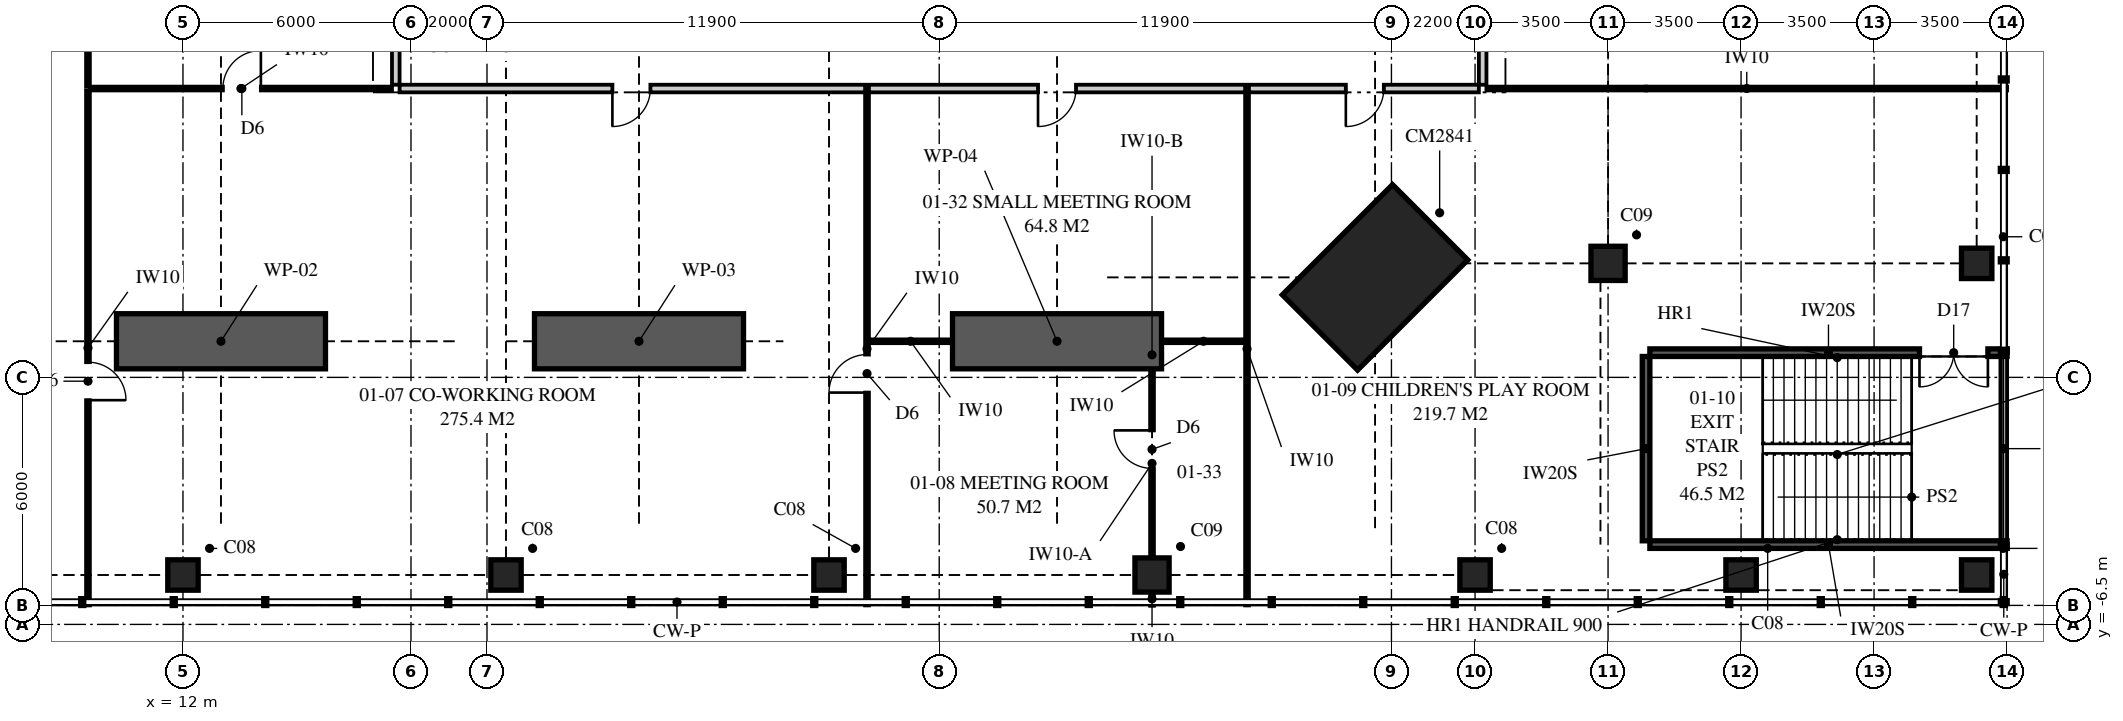
"""IFC4 building model, lengths in metres.
Left out: names, types, materials, properties, quantities, classifications, styles, units other than length and angle.
Written with IfcOpenShell. Run it as: python <this file> out.ifc"""

import sys

from ifc_helpers import new_model, si_unit, direction, frame, frame_2d, origin, origin_2d, place, context, subcontext, project, spatial, polyline, rectangle, outline, extrude, element, fill, save


model = new_model("IFC4")
c1 = context("Model", 3, precision=1e-05, world=origin(), true_north=direction((0.0, 1.0)))
c2 = subcontext(c1, "Body", "Model", "MODEL_VIEW")
j1 = project(units=[si_unit("LENGTHUNIT", "METRE"), si_unit("PLANEANGLEUNIT", "RADIAN")], contexts=[c1])
p1 = place(None, origin())
s1 = spatial("IfcSite", under=j1, at=p1, CompositionType="ELEMENT")
p2 = place(p1, origin())
s2 = spatial("IfcBuilding", under=s1, at=p2, CompositionType="ELEMENT")
p3 = place(p2, frame((0.0, 0.0, 6.0)))
s3 = spatial("IfcBuildingStorey", under=s2, at=p3, CompositionType="ELEMENT", Elevation=6.0)
p4 = place(p3, frame((43.369, 2.631, 0.0), z_axis=(0.0, 0.0, 1.0), x_axis=(-0.707106781187, 0.707106781187, 0.0)))
e1 = element("IfcColumn", 1, at=p4, inside=s3, PredefinedType="COLUMN", context=c2, shape_type="SweptSolid", body=[
    extrude(rectangle(XDim=2.8, YDim=4.1, at=origin_2d()), origin(), (0.0, 0.0, 1.0), 5.0),
])
for number, where, z_axis, x_axis in (
    (2, (12.0, -5.2, 0.0), (0.0, 0.0, 1.0), (1.0, 0.0, 0.0)),
    (3, (20.5, -5.2, 0.0), (0.0, 0.0, 1.0), (1.0, 0.0, 0.0)),
    (4, (29.0, -5.2, 0.0), (0.0, 0.0, 1.0), (1.0, 0.0, 0.0)),
):
    element("IfcColumn", number, at=place(p3, frame(where, z_axis=z_axis, x_axis=x_axis)), inside=s3, PredefinedType="COLUMN", context=c2, shape_type="SweptSolid", body=[
        extrude(rectangle(XDim=0.8, YDim=0.8, at=origin_2d()), origin(), (0.0, 0.0, 1.0), 5.0),
    ])
p5 = place(p3, frame((37.5, -5.2, 0.0), z_axis=(0.0, 0.0, 1.0), x_axis=(1.0, 0.0, 0.0)))
e5 = element("IfcColumn", 5, at=p5, inside=s3, PredefinedType="COLUMN", context=c2, shape_type="SweptSolid", body=[
    extrude(rectangle(XDim=0.9, YDim=0.9, at=origin_2d()), origin(), (0.0, 0.0, 1.0), 5.0),
])
for number, where, z_axis, x_axis in (
    (6, (46.0, -5.2, 0.0), (0.0, 0.0, 1.0), (1.0, 0.0, 0.0)),
    (7, (53.0, -5.2, 0.0), (0.0, 0.0, 1.0), (1.0, 0.0, 0.0)),
    (8, (59.2, -5.2, 0.0), (0.0, 0.0, 1.0), (1.0, 0.0, 0.0)),
):
    element("IfcColumn", number, at=place(p3, frame(where, z_axis=z_axis, x_axis=x_axis)), inside=s3, PredefinedType="COLUMN", context=c2, shape_type="SweptSolid", body=[
        extrude(rectangle(XDim=0.8, YDim=0.8, at=origin_2d()), origin(), (0.0, 0.0, 1.0), 5.0),
    ])
p6 = place(p3, frame((49.5, 3.0, 0.0), z_axis=(0.0, 0.0, 1.0), x_axis=(1.0, 0.0, 0.0)))
e9 = element("IfcColumn", 9, at=p6, inside=s3, PredefinedType="COLUMN", context=c2, shape_type="SweptSolid", body=[
    extrude(rectangle(XDim=0.9, YDim=0.9, at=origin_2d()), origin(), (0.0, 0.0, 1.0), 5.0),
])
p7 = place(p3, frame((59.2, 3.0, 0.0), z_axis=(0.0, 0.0, 1.0), x_axis=(1.0, 0.0, 0.0)))
e10 = element("IfcColumn", 10, at=p7, inside=s3, PredefinedType="COLUMN", context=c2, shape_type="SweptSolid", body=[
    extrude(rectangle(XDim=0.8, YDim=0.8, at=origin_2d()), origin(), (0.0, 0.0, 1.0), 5.0),
])
p8 = place(p3, frame((59.913, -4.45, 0.0), z_axis=(0.0, 0.0, 1.0), x_axis=(0.0, 1.0, 0.0)))
e11 = element("IfcWall", 11, at=p8, inside=s3, PredefinedType="SOLIDWALL", context=c2, shape_type="SweptSolid", body=[
    extrude(rectangle(XDim=5.15, YDim=0.175, at=frame_2d((2.575, 0.0))), origin(), (0.0, 0.0, 1.0), 4.72),
])
p9 = place(p3, frame((9.5, 7.65, 0.0), z_axis=(0.0, 0.0, 1.0), x_axis=(0.0, 1.0, 0.0)))
e12 = element("IfcWall", 12, at=p9, inside=s3, PredefinedType="PARTITIONING", context=c2, shape_type="SweptSolid", body=[
    extrude(outline(polyline([(0.0, 0.0), (5.35, 0.0), (5.35, 4.12), (4.09, 4.12), (4.09, 4.72), (0.0, 4.72), (0.0, 0.0)])), frame((0.0, 0.05, 0.0), z_axis=(0.0, -1.0, 0.0), x_axis=(1.0, 0.0, 0.0)), (0.0, 0.0, 1.0), 0.1),
])
p10 = place(p3, frame((9.5, -6.0, 0.0), z_axis=(0.0, 0.0, 1.0), x_axis=(0.0, 1.0, 0.0)))
e13 = element("IfcWall", 13, at=p10, inside=s3, PredefinedType="PARTITIONING", context=c2, shape_type="SweptSolid", body=[
    extrude(outline(polyline([(0.0, 0.0), (13.55, 0.0), (13.55, 4.72), (8.21, 4.72), (8.21, 3.92), (5.69, 3.92), (5.69, 4.72), (2.06, 4.72), (2.06, 4.12), (0.0, 4.12), (0.0, 4.72), (0.0, 0.0)])), frame((0.0, 0.05, 0.0), z_axis=(0.0, -1.0, 0.0), x_axis=(1.0, 0.0, 0.0)), (0.0, 0.0, 1.0), 0.1),
])
p11 = place(p10, frame((5.4, 0.0, 0.0)))
e14 = element("IfcOpeningElement", 14, at=p11, cuts=e13, PredefinedType="OPENING", context=c2, shape_type="SweptSolid", body=[
    extrude(rectangle(XDim=1.0, YDim=2.1, at=frame_2d((0.5, 1.05))), frame((0.0, 0.06, 0.0), z_axis=(0.0, -1.0, 0.0), x_axis=(1.0, 0.0, 0.0)), (0.0, 0.0, 1.0), 0.12),
])
p12 = place(p3, frame((9.55, 7.6, 0.0), z_axis=(0.0, 0.0, 1.0), x_axis=(1.0, 0.0, 0.0)))
e15 = element("IfcWall", 15, at=p12, inside=s3, PredefinedType="PARTITIONING", context=c2, shape_type="SweptSolid", body=[
    extrude(outline(polyline([(0.0, 0.0), (7.95, 0.0), (7.95, 4.72), (4.71, 4.72), (4.71, 4.12), (2.19, 4.12), (2.19, 4.72), (0.0, 4.72), (0.0, 0.0)])), frame((0.0, 0.05, 0.0), z_axis=(0.0, -1.0, 0.0), x_axis=(1.0, 0.0, 0.0)), (0.0, 0.0, 1.0), 0.1),
])
p13 = place(p12, frame((3.5, 0.0, 0.0)))
e16 = element("IfcOpeningElement", 16, at=p13, cuts=e15, PredefinedType="OPENING", context=c2, shape_type="SweptSolid", body=[
    extrude(rectangle(XDim=1.0, YDim=2.1, at=frame_2d((0.5, 1.05))), frame((0.0, 0.06, 0.0), z_axis=(0.0, -1.0, 0.0), x_axis=(1.0, 0.0, 0.0)), (0.0, 0.0, 1.0), 0.12),
])
p14 = place(p3, frame((17.6, 7.7, 0.0), z_axis=(0.0, 0.0, 1.0), x_axis=(0.0, 1.0, 0.0)))
e17 = element("IfcWall", 17, at=p14, inside=s3, PredefinedType="PARTITIONING", context=c2, shape_type="SweptSolid", body=[
    extrude(rectangle(XDim=1.55, YDim=0.2, at=frame_2d((0.775, 0.0))), origin(), (0.0, 0.0, 1.0), 4.72),
])
p15 = place(p3, frame((30.0, -6.0, 0.0), z_axis=(0.0, 0.0, 1.0), x_axis=(0.0, 1.0, 0.0)))
e18 = element("IfcWall", 18, at=p15, inside=s3, PredefinedType="PARTITIONING", context=c2, shape_type="SweptSolid", body=[
    extrude(outline(polyline([(0.0, 0.0), (13.5, 0.0), (13.5, 4.72), (13.5, 4.12), (2.06, 4.12), (0.0, 4.12), (0.0, 4.72), (0.0, 0.0)])), frame((0.0, 0.05, 0.0), z_axis=(0.0, -1.0, 0.0), x_axis=(1.0, 0.0, 0.0)), (0.0, 0.0, 1.0), 0.1),
])
p16 = place(p15, frame((5.6, 0.0, 0.0)))
e19 = element("IfcOpeningElement", 19, at=p16, cuts=e18, PredefinedType="OPENING", context=c2, shape_type="SweptSolid", body=[
    extrude(rectangle(XDim=1.0, YDim=2.1, at=frame_2d((0.5, 1.05))), frame((0.0, 0.06, 0.0), z_axis=(0.0, -1.0, 0.0), x_axis=(1.0, 0.0, 0.0)), (0.0, 0.0, 1.0), 0.12),
])
p17 = place(p3, frame((17.7, 7.6, 0.0), z_axis=(0.0, 0.0, 1.0), x_axis=(1.0, 0.0, 0.0)))
e20 = element("IfcWall", 20, at=p17, inside=s3, PredefinedType="PARTITIONING", context=c2, shape_type="SweptSolid", body=[
    extrude(outline(polyline([(0.0, 0.0), (12.25, 0.0), (12.25, 4.72), (12.25, 4.12), (9.99, 4.12), (9.99, 4.72), (7.61, 4.72), (7.61, 4.12), (4.99, 4.12), (4.99, 4.72), (4.11, 4.72), (4.11, 4.12), (1.49, 4.12), (1.49, 4.72), (0.0, 4.72), (0.0, 0.0)])), frame((0.0, 0.1, 0.0), z_axis=(0.0, -1.0, 0.0), x_axis=(1.0, 0.0, 0.0)), (0.0, 0.0, 1.0), 0.2),
])
p18 = place(p17, frame((5.6, 0.0, 0.0)))
e21 = element("IfcOpeningElement", 21, at=p18, cuts=e20, PredefinedType="OPENING", context=c2, shape_type="SweptSolid", body=[
    extrude(rectangle(XDim=1.0, YDim=2.1, at=frame_2d((0.5, 1.05))), frame((0.0, 0.11, 0.0), z_axis=(0.0, -1.0, 0.0), x_axis=(1.0, 0.0, 0.0)), (0.0, 0.0, 1.0), 0.22),
])
p19 = place(p3, frame((40.0, -6.0, 0.0), z_axis=(0.0, 0.0, 1.0), x_axis=(0.0, 1.0, 0.0)))
e22 = element("IfcWall", 22, at=p19, inside=s3, PredefinedType="PARTITIONING", context=c2, shape_type="SweptSolid", body=[
    extrude(outline(polyline([(0.0, 0.0), (13.5, 0.0), (13.5, 4.72), (9.891, 4.72), (9.891, 4.12), (7.371, 4.12), (7.371, 4.72), (2.06, 4.72), (2.06, 4.12), (0.0, 4.12), (0.0, 4.72), (0.0, 0.0)])), frame((0.0, 0.05, 0.0), z_axis=(0.0, -1.0, 0.0), x_axis=(1.0, 0.0, 0.0)), (0.0, 0.0, 1.0), 0.1),
])
p20 = place(p3, frame((30.05, 7.6, 0.0), z_axis=(0.0, 0.0, 1.0), x_axis=(1.0, 0.0, 0.0)))
e23 = element("IfcWall", 23, at=p20, inside=s3, PredefinedType="PARTITIONING", context=c2, shape_type="SweptSolid", body=[
    extrude(outline(polyline([(0.0, 0.0), (9.9, 0.0), (9.9, 4.72), (6.26, 4.72), (6.26, 4.12), (3.64, 4.12), (3.64, 4.72), (0.26, 4.72), (0.26, 4.12), (0.0, 4.12), (0.0, 4.72), (0.0, 0.0)])), frame((0.0, 0.1, 0.0), z_axis=(0.0, -1.0, 0.0), x_axis=(1.0, 0.0, 0.0)), (0.0, 0.0, 1.0), 0.2),
])
p21 = place(p20, frame((4.45, 0.0, 0.0)))
e24 = element("IfcOpeningElement", 24, at=p21, cuts=e23, PredefinedType="OPENING", context=c2, shape_type="SweptSolid", body=[
    extrude(rectangle(XDim=1.0, YDim=2.1, at=frame_2d((0.5, 1.05))), frame((0.0, 0.11, 0.0), z_axis=(0.0, -1.0, 0.0), x_axis=(1.0, 0.0, 0.0)), (0.0, 0.0, 1.0), 0.22),
])
p22 = place(p3, frame((50.5, -4.3, 0.0), z_axis=(0.0, 0.0, 1.0), x_axis=(0.0, 1.0, 0.0)))
e25 = element("IfcWall", 25, at=p22, inside=s3, PredefinedType="SOLIDWALL", context=c2, shape_type="SweptSolid", body=[
    extrude(rectangle(XDim=4.85, YDim=0.2, at=frame_2d((2.425, 0.0))), origin(), (0.0, 0.0, 1.0), 5.0),
])
p23 = place(p3, frame((40.05, 7.6, 0.0), z_axis=(0.0, 0.0, 1.0), x_axis=(1.0, 0.0, 0.0)))
e26 = element("IfcWall", 26, at=p23, inside=s3, PredefinedType="PARTITIONING", context=c2, shape_type="SweptSolid", body=[
    extrude(outline(polyline([(0.0, 0.0), (6.05, 0.0), (6.05, 4.72), (4.629, 4.72), (4.629, 3.92), (2.009, 3.92), (2.009, 4.72), (0.0, 4.72), (0.0, 0.0)])), frame((0.0, 0.1, 0.0), z_axis=(0.0, -1.0, 0.0), x_axis=(1.0, 0.0, 0.0)), (0.0, 0.0, 1.0), 0.2),
])
p24 = place(p23, frame((2.55, 0.0, 0.0)))
e27 = element("IfcOpeningElement", 27, at=p24, cuts=e26, PredefinedType="OPENING", context=c2, shape_type="SweptSolid", body=[
    extrude(rectangle(XDim=1.0, YDim=2.1, at=frame_2d((0.5, 1.05))), frame((0.0, 0.11, 0.0), z_axis=(0.0, -1.0, 0.0), x_axis=(1.0, 0.0, 0.0)), (0.0, 0.0, 1.0), 0.22),
])
p25 = place(p3, frame((46.3, 7.6, 0.0), z_axis=(0.0, 0.0, 1.0), x_axis=(1.0, 0.0, 0.0)))
e28 = element("IfcWall", 28, at=p25, inside=s3, PredefinedType="PARTITIONING", context=c2, shape_type="SweptSolid", body=[
    extrude(outline(polyline([(0.0, 0.0), (4.2, 0.0), (4.2, 4.72), (4.2, 4.12), (1.94, 4.12), (1.94, 4.72), (0.0, 4.72), (0.0, 0.0)])), frame((0.0, 0.05, 0.0), z_axis=(0.0, -1.0, 0.0), x_axis=(1.0, 0.0, 0.0)), (0.0, 0.0, 1.0), 0.1),
])
p26 = place(p3, frame((50.6, -4.4, 0.0), z_axis=(0.0, 0.0, 1.0), x_axis=(1.0, 0.0, 0.0)))
e29 = element("IfcWall", 29, at=p26, inside=s3, PredefinedType="SOLIDWALL", context=c2, shape_type="SweptSolid", body=[
    extrude(rectangle(XDim=9.4, YDim=0.2, at=frame_2d((4.7, 0.0))), origin(), (0.0, 0.0, 1.0), 5.0),
])
p27 = place(p3, frame((50.6, 0.65, 0.0), z_axis=(0.0, 0.0, 1.0), x_axis=(1.0, 0.0, 0.0)))
e30 = element("IfcWall", 30, at=p27, inside=s3, PredefinedType="SOLIDWALL", context=c2, shape_type="SweptSolid", body=[
    extrude(rectangle(XDim=9.4, YDim=0.2, at=frame_2d((4.7, 0.0))), origin(), (0.0, 0.0, 1.0), 5.0),
])
p28 = place(p27, frame((7.095, 0.0, 0.0)))
e31 = element("IfcOpeningElement", 31, at=p28, cuts=e30, PredefinedType="OPENING", context=c2, shape_type="SweptSolid", body=[
    extrude(rectangle(XDim=1.8, YDim=2.2, at=frame_2d((0.9, 1.1))), frame((0.0, 0.11, 0.0), z_axis=(0.0, -1.0, 0.0), x_axis=(1.0, 0.0, 0.0)), (0.0, 0.0, 1.0), 0.22),
])
p29 = place(p3, frame((50.5, 7.6, 0.0), z_axis=(0.0, 0.0, 1.0), x_axis=(1.0, 0.0, 0.0)))
e32 = element("IfcWall", 32, at=p29, inside=s3, PredefinedType="PARTITIONING", context=c2, shape_type="SweptSolid", body=[
    extrude(outline(polyline([(0.0, 0.0), (9.5, 0.0), (9.5, 4.72), (9.5, 4.12), (7.44, 4.12), (7.44, 4.72), (0.26, 4.72), (0.26, 4.12), (0.0, 4.12), (0.0, 4.72), (0.0, 0.0)])), frame((0.0, 0.05, 0.0), z_axis=(0.0, -1.0, 0.0), x_axis=(1.0, 0.0, 0.0)), (0.0, 0.0, 1.0), 0.1),
])
p30 = place(p3, frame((46.2, 7.7, 0.0), z_axis=(0.0, 0.0, 1.0), x_axis=(0.0, 1.0, 0.0)))
e33 = element("IfcWall", 33, at=p30, inside=s3, PredefinedType="PARTITIONING", context=c2, shape_type="SweptSolid", body=[
    extrude(rectangle(XDim=1.55, YDim=0.2, at=frame_2d((0.775, 0.0))), origin(), (0.0, 0.0, 1.0), 4.72),
])
p31 = place(p3, frame((30.04, 0.95, 0.0), z_axis=(0.0, 0.0, 1.0), x_axis=(1.0, 0.0, 0.0)))
e34 = element("IfcWall", 34, at=p31, inside=s3, PredefinedType="PARTITIONING", context=c2, shape_type="SweptSolid", body=[
    extrude(outline(polyline([(0.0, 0.0), (2.21, 0.0), (2.21, 4.72), (2.21, 4.12), (0.22, 4.12), (0.0, 4.12), (0.0, 4.72), (0.0, 0.0)])), frame((0.0, 0.05, 0.0), z_axis=(0.0, -1.0, 0.0), x_axis=(1.0, 0.0, 0.0)), (0.0, 0.0, 1.0), 0.1),
])
p32 = place(p3, frame((37.75, 0.95, 0.0), z_axis=(0.0, 0.0, 1.0), x_axis=(1.0, 0.0, 0.0)))
e35 = element("IfcWall", 35, at=p32, inside=s3, PredefinedType="PARTITIONING", context=c2, shape_type="SweptSolid", body=[
    extrude(rectangle(XDim=2.21, YDim=0.1, at=frame_2d((1.105, 0.0))), origin(), (0.0, 0.0, 1.0), 4.72),
])
p33 = place(p3, frame((37.5, -6.01, 0.0), z_axis=(0.0, 0.0, 1.0), x_axis=(0.0, 1.0, 0.0)))
e36 = element("IfcWall", 36, at=p33, inside=s3, PredefinedType="PARTITIONING", context=c2, shape_type="SweptSolid", body=[
    extrude(outline(polyline([(0.0, 0.0), (0.36, 0.0), (0.36, 4.72), (0.36, 4.12), (0.0, 4.12), (0.0, 4.72), (0.0, 0.0)])), frame((0.0, 0.05, 0.0), z_axis=(0.0, -1.0, 0.0), x_axis=(1.0, 0.0, 0.0)), (0.0, 0.0, 1.0), 0.1),
])
p34 = place(p3, frame((37.5, -4.75, 0.0), z_axis=(0.0, 0.0, 1.0), x_axis=(0.0, 1.0, 0.0)))
e37 = element("IfcWall", 37, at=p34, inside=s3, PredefinedType="PARTITIONING", context=c2, shape_type="SweptSolid", body=[
    extrude(rectangle(XDim=4.975, YDim=0.1, at=frame_2d((2.488, 0.0))), origin(), (0.0, 0.0, 1.0), 4.12),
])
p35 = place(p34, frame((2.355, 0.0, 0.0)))
e38 = element("IfcOpeningElement", 38, at=p35, cuts=e37, PredefinedType="OPENING", context=c2, shape_type="SweptSolid", body=[
    extrude(rectangle(XDim=1.0, YDim=2.1, at=frame_2d((0.5, 1.05))), frame((0.0, 0.06, 0.0), z_axis=(0.0, -1.0, 0.0), x_axis=(1.0, 0.0, 0.0)), (0.0, 0.0, 1.0), 0.12),
])
p36 = place(p3, frame((37.5, 0.225, 0.0), z_axis=(0.0, 0.0, 1.0), x_axis=(0.0, 1.0, 0.0)))
e39 = element("IfcWall", 39, at=p36, inside=s3, PredefinedType="PARTITIONING", context=c2, shape_type="SweptSolid", body=[
    extrude(outline(polyline([(0.0, 0.0), (0.735, 0.0), (0.735, 4.72), (0.06, 4.72), (0.06, 4.12), (0.0, 4.12), (0.0, 0.0)])), frame((0.0, 0.05, 0.0), z_axis=(0.0, -1.0, 0.0), x_axis=(1.0, 0.0, 0.0)), (0.0, 0.0, 1.0), 0.1),
])
for number, where, z_axis, x_axis in (
    (40, (10.25, 0.95, 0.0), (0.0, 0.0, 1.0), (1.0, 0.0, 0.0)),
    (41, (21.25, 0.95, 0.0), (0.0, 0.0, 1.0), (1.0, 0.0, 0.0)),
    (42, (32.25, 0.95, 0.0), (0.0, 0.0, 1.0), (1.0, 0.0, 0.0)),
):
    element("IfcWall", number, at=place(p3, frame(where, z_axis=z_axis, x_axis=x_axis)), inside=s3, PredefinedType="SHEAR", context=c2, shape_type="SweptSolid", body=[
        extrude(rectangle(XDim=5.5, YDim=1.45, at=frame_2d((2.75, 0.0))), origin(), (0.0, 0.0, 1.0), 5.0),
    ])
p37 = place(p13, origin())
e43 = element("IfcDoor", 43, at=p37, inside=s3, OperationType="SINGLE_SWING_RIGHT", PredefinedType="DOOR", context=c2, shape_type="SweptSolid", body=[
    extrude(rectangle(XDim=1.0, YDim=2.1, at=frame_2d((0.5, 1.05))), frame((0.0, 0.025, 0.0), z_axis=(0.0, -1.0, 0.0), x_axis=(1.0, 0.0, 0.0)), (0.0, 0.0, 1.0), 0.05),
])
fill(e16, e43)
p38 = place(p11, frame((1.0, 0.0, 0.0), z_axis=(0.0, 0.0, 1.0), x_axis=(-1.0, 0.0, 0.0)))
e44 = element("IfcDoor", 44, at=p38, inside=s3, OperationType="SINGLE_SWING_RIGHT", PredefinedType="DOOR", context=c2, shape_type="SweptSolid", body=[
    extrude(rectangle(XDim=1.0, YDim=2.1, at=frame_2d((0.5, 1.05))), frame((0.0, 0.025, 0.0), z_axis=(0.0, -1.0, 0.0), x_axis=(1.0, 0.0, 0.0)), (0.0, 0.0, 1.0), 0.05),
])
fill(e14, e44)
p39 = place(p16, origin())
e45 = element("IfcDoor", 45, at=p39, inside=s3, OperationType="SINGLE_SWING_LEFT", PredefinedType="DOOR", context=c2, shape_type="SweptSolid", body=[
    extrude(rectangle(XDim=1.0, YDim=2.1, at=frame_2d((0.5, 1.05))), frame((0.0, 0.025, 0.0), z_axis=(0.0, -1.0, 0.0), x_axis=(1.0, 0.0, 0.0)), (0.0, 0.0, 1.0), 0.05),
])
fill(e19, e45)
p40 = place(p18, frame((1.0, 0.0, 0.0), z_axis=(0.0, 0.0, 1.0), x_axis=(-1.0, 0.0, 0.0)))
e46 = element("IfcDoor", 46, at=p40, inside=s3, OperationType="SINGLE_SWING_RIGHT", PredefinedType="DOOR", context=c2, shape_type="SweptSolid", body=[
    extrude(rectangle(XDim=1.0, YDim=2.1, at=frame_2d((0.5, 1.05))), frame((0.0, 0.025, 0.0), z_axis=(0.0, -1.0, 0.0), x_axis=(1.0, 0.0, 0.0)), (0.0, 0.0, 1.0), 0.05),
])
fill(e21, e46)
p41 = place(p21, frame((1.0, 0.0, 0.0), z_axis=(0.0, 0.0, 1.0), x_axis=(-1.0, 0.0, 0.0)))
e47 = element("IfcDoor", 47, at=p41, inside=s3, OperationType="SINGLE_SWING_RIGHT", PredefinedType="DOOR", context=c2, shape_type="SweptSolid", body=[
    extrude(rectangle(XDim=1.0, YDim=2.1, at=frame_2d((0.5, 1.05))), frame((0.0, 0.025, 0.0), z_axis=(0.0, -1.0, 0.0), x_axis=(1.0, 0.0, 0.0)), (0.0, 0.0, 1.0), 0.05),
])
fill(e24, e47)
p42 = place(p24, frame((1.0, 0.0, 0.0), z_axis=(0.0, 0.0, 1.0), x_axis=(-1.0, 0.0, 0.0)))
e48 = element("IfcDoor", 48, at=p42, inside=s3, OperationType="SINGLE_SWING_RIGHT", PredefinedType="DOOR", context=c2, shape_type="SweptSolid", body=[
    extrude(rectangle(XDim=1.0, YDim=2.1, at=frame_2d((0.5, 1.05))), frame((0.0, 0.025, 0.0), z_axis=(0.0, -1.0, 0.0), x_axis=(1.0, 0.0, 0.0)), (0.0, 0.0, 1.0), 0.05),
])
fill(e27, e48)
p43 = place(p28, frame((1.8, 0.0, 0.0), z_axis=(0.0, 0.0, 1.0), x_axis=(-1.0, 0.0, 0.0)))
e49 = element("IfcDoor", 49, at=p43, inside=s3, OperationType="DOUBLE_DOOR_SINGLE_SWING", PredefinedType="DOOR", context=c2, shape_type="SweptSolid", body=[
    extrude(rectangle(XDim=1.8, YDim=2.2, at=frame_2d((0.9, 1.1))), frame((0.0, 0.025, 0.0), z_axis=(0.0, -1.0, 0.0), x_axis=(1.0, 0.0, 0.0)), (0.0, 0.0, 1.0), 0.05),
])
fill(e31, e49)
p44 = place(p35, origin())
e50 = element("IfcDoor", 50, at=p44, inside=s3, OperationType="SINGLE_SWING_RIGHT", PredefinedType="DOOR", context=c2, shape_type="SweptSolid", body=[
    extrude(rectangle(XDim=1.0, YDim=2.1, at=frame_2d((0.5, 1.05))), frame((0.0, 0.025, 0.0), z_axis=(0.0, -1.0, 0.0), x_axis=(1.0, 0.0, 0.0)), (0.0, 0.0, 1.0), 0.05),
])
fill(e38, e50)
save(model, sys.argv[1])
